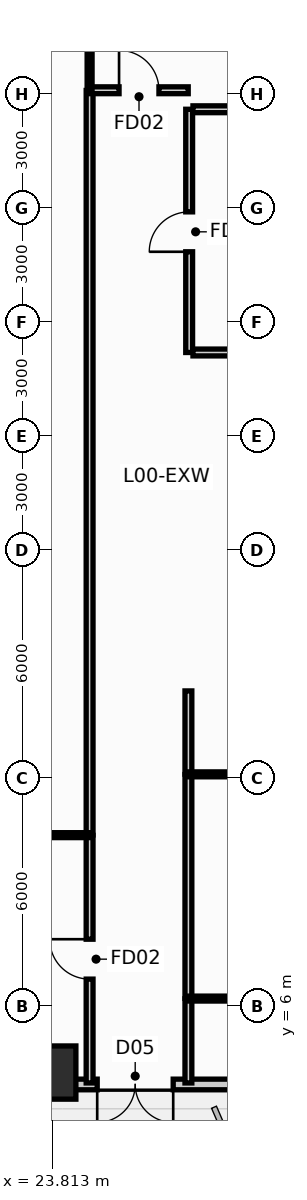
"""IFC4 building model, lengths in metres.
Left out: names, types, materials, properties, quantities, classifications, styles, units other than length and angle.
Written with IfcOpenShell. Run it as: python <this file> out.ifc"""

import sys

from ifc_helpers import new_model, si_unit, direction, frame, frame_2d, origin, origin_2d, place, context, subcontext, project, spatial, rectangle, hollow_rectangle, extrude, source, transform, mapped, element, fill, save


model = new_model("IFC4")
c1 = context("Model", 3, precision=1e-05, world=origin(), true_north=direction((0.0, 1.0)))
c2 = subcontext(c1, "Body", "Model", "MODEL_VIEW")
j1 = project(units=[si_unit("LENGTHUNIT", "METRE"), si_unit("PLANEANGLEUNIT", "RADIAN")], contexts=[c1])
p1 = place(None, origin())
s1 = spatial("IfcSite", under=j1, at=p1, CompositionType="ELEMENT")
p2 = place(p1, origin())
s2 = spatial("IfcBuilding", under=s1, at=p2, CompositionType="ELEMENT")
p3 = place(p2, origin())
s3 = spatial("IfcBuildingStorey", under=s2, at=p3, CompositionType="ELEMENT", Elevation=0.0)
m1 = source(origin(), c2, "Body", "SweptSolid", [
    extrude(hollow_rectangle(XDim=1.4, YDim=1.4, WallThickness=0.08, at=origin_2d()), origin(), (0.0, 0.0, 1.0), 5.401),
])
p4 = place(p3, frame((23.739, 4.253, 0.0), z_axis=(-0.013469326265, 0.019797197665, 0.999713283004), x_axis=(-0.826786039216, -0.562516528964, 0.0)))
e1 = element("IfcColumn", 1, at=p4, inside=s3, PredefinedType="COLUMN", context=c2, shape_type="MappedRepresentation", body=[
    mapped(m1, transform((0.0, 0.0, 0.0), scale=1.0)),
])
p5 = place(p3, frame((45.0, 3.94, 0.0), z_axis=(0.0, 0.0, 1.0), x_axis=(-1.0, 0.0, 0.0)))
e2 = element("IfcWall", 2, at=p5, inside=s3, PredefinedType="STANDARD", context=c2, shape_type="SweptSolid", body=[
    extrude(rectangle(XDim=41.06, YDim=0.28, at=frame_2d((20.53, 0.0))), origin(), (0.0, 0.0, 1.0), 4.065),
])
p6 = place(p5, frame((18.0, 0.0, 0.0)))
e3 = element("IfcOpeningElement", 3, at=p6, cuts=e2, PredefinedType="OPENING", context=c2, shape_type="SweptSolid", body=[
    extrude(rectangle(XDim=2.0, YDim=2.4, at=frame_2d((1.0, 1.2))), frame((0.0, 0.152, 0.0), z_axis=(0.0, -1.0, 0.0), x_axis=(1.0, 0.0, 0.0)), (0.0, 0.0, 1.0), 0.304),
])
p7 = place(p5, frame((25.5, 0.0, 0.0)))
e4 = element("IfcOpeningElement", 4, at=p7, cuts=e2, PredefinedType="OPENING", context=c2, shape_type="SweptSolid", body=[
    extrude(rectangle(XDim=1.1, YDim=2.2, at=frame_2d((0.55, 1.1))), frame((0.0, 0.152, 0.0), z_axis=(0.0, -1.0, 0.0), x_axis=(1.0, 0.0, 0.0)), (0.0, 0.0, 1.0), 0.304),
])
p8 = place(p5, frame((33.16, 0.0, 1.0)))
e5 = element("IfcOpeningElement", 5, at=p8, cuts=e2, PredefinedType="OPENING", context=c2, shape_type="SweptSolid", body=[
    extrude(rectangle(XDim=2.4, YDim=1.95, at=frame_2d((1.2, 0.975))), frame((0.0, 0.152, 0.0), z_axis=(0.0, -1.0, 0.0), x_axis=(1.0, 0.0, 0.0)), (0.0, 0.0, 1.0), 0.304),
])
p9 = place(p3, frame((27.42, 23.2, 0.0), z_axis=(0.0, 0.0, 1.0), x_axis=(0.0, 1.0, 0.0)))
e6 = element("IfcWall", 6, at=p9, inside=s3, PredefinedType="PARTITIONING", context=c2, shape_type="SweptSolid", body=[
    extrude(rectangle(XDim=6.4, YDim=0.18, at=frame_2d((3.2, 0.0))), origin(), (0.0, 0.0, 1.0), 4.706),
])
p10 = place(p9, frame((2.65, 0.0, 0.0)))
e7 = element("IfcOpeningElement", 7, at=p10, cuts=e6, PredefinedType="OPENING", context=c2, shape_type="SweptSolid", body=[
    extrude(rectangle(XDim=1.05, YDim=2.15, at=frame_2d((0.525, 1.075))), frame((0.0, 0.102, 0.0), z_axis=(0.0, -1.0, 0.0), x_axis=(1.0, 0.0, 0.0)), (0.0, 0.0, 1.0), 0.204),
])
p11 = place(p3, frame((27.52, 23.2, 0.0), z_axis=(0.0, 0.0, 1.0), x_axis=(1.0, 0.0, 0.0)))
e8 = element("IfcWall", 8, at=p11, inside=s3, PredefinedType="PARTITIONING", context=c2, shape_type="SweptSolid", body=[
    extrude(rectangle(XDim=2.76, YDim=0.18, at=frame_2d((1.38, 0.0))), origin(), (0.0, 0.0, 1.0), 5.08),
])
p12 = place(p3, frame((27.52, 29.6, 0.0), z_axis=(0.0, 0.0, 1.0), x_axis=(1.0, 0.0, 0.0)))
e9 = element("IfcWall", 9, at=p12, inside=s3, PredefinedType="PARTITIONING", context=c2, shape_type="SweptSolid", body=[
    extrude(rectangle(XDim=2.76, YDim=0.18, at=frame_2d((1.38, 0.0))), origin(), (0.0, 0.0, 1.0), 4.453),
])
p13 = place(p3, frame((24.8, 10.505, 0.0), z_axis=(0.0, 0.0, 1.0), x_axis=(0.0, 1.0, 0.0)))
e10 = element("IfcWall", 10, at=p13, inside=s3, PredefinedType="PARTITIONING", context=c2, shape_type="SweptSolid", body=[
    extrude(rectangle(XDim=19.59, YDim=0.18, at=frame_2d((9.795, 0.0))), origin(), (0.0, 0.0, 1.0), 4.706),
])
p14 = place(p3, frame((24.8, 3.98, 0.0), z_axis=(0.0, 0.0, 1.0), x_axis=(0.0, 1.0, 0.0)))
e11 = element("IfcWall", 11, at=p14, inside=s3, PredefinedType="PARTITIONING", context=c2, shape_type="SweptSolid", body=[
    extrude(rectangle(XDim=6.515, YDim=0.18, at=frame_2d((3.258, 0.0))), origin(), (0.0, 0.0, 1.0), 5.08),
])
p15 = place(p14, frame((2.732, 0.0, 0.0)))
e12 = element("IfcOpeningElement", 12, at=p15, cuts=e11, PredefinedType="OPENING", context=c2, shape_type="SweptSolid", body=[
    extrude(rectangle(XDim=1.05, YDim=2.15, at=frame_2d((0.525, 1.075))), frame((0.0, 0.102, 0.0), z_axis=(0.0, -1.0, 0.0), x_axis=(1.0, 0.0, 0.0)), (0.0, 0.0, 1.0), 0.204),
])
p16 = place(p3, frame((27.4, 6.205, 0.0), z_axis=(0.0, 0.0, 1.0), x_axis=(0.0, 1.0, 0.0)))
e13 = element("IfcWall", 13, at=p16, inside=s3, PredefinedType="PARTITIONING", context=c2, shape_type="SweptSolid", body=[
    extrude(rectangle(XDim=5.89, YDim=0.18, at=frame_2d((2.945, 0.0))), origin(), (0.0, 0.0, 1.0), 5.08),
])
p17 = place(p3, frame((24.805, 30.1, 0.0), z_axis=(0.0, 0.0, 1.0), x_axis=(1.0, 0.0, 0.0)))
e14 = element("IfcWall", 14, at=p17, inside=s3, PredefinedType="PARTITIONING", context=c2, shape_type="SweptSolid", body=[
    extrude(rectangle(XDim=2.59, YDim=0.18, at=frame_2d((1.295, 0.0))), origin(), (0.0, 0.0, 1.0), 4.453),
])
p18 = place(p17, frame((0.77, 0.0, 0.0)))
e15 = element("IfcOpeningElement", 15, at=p18, cuts=e14, PredefinedType="OPENING", context=c2, shape_type="SweptSolid", body=[
    extrude(rectangle(XDim=1.05, YDim=2.15, at=frame_2d((0.525, 1.075))), frame((0.0, 0.102, 0.0), z_axis=(0.0, -1.0, 0.0), x_axis=(1.0, 0.0, 0.0)), (0.0, 0.0, 1.0), 0.204),
])
p19 = place(p3, frame((27.4, 3.98, 0.0), z_axis=(0.0, 0.0, 1.0), x_axis=(0.0, 1.0, 0.0)))
e16 = element("IfcWall", 16, at=p19, inside=s3, PredefinedType="PARTITIONING", context=c2, shape_type="SweptSolid", body=[
    extrude(rectangle(XDim=2.215, YDim=0.18, at=frame_2d((1.107, 0.0))), origin(), (0.0, 0.0, 1.0), 5.08),
])
p20 = place(p3, frame((27.4, 12.105, 0.0), z_axis=(0.0, 0.0, 1.0), x_axis=(0.0, 1.0, 0.0)))
e17 = element("IfcWall", 17, at=p20, inside=s3, PredefinedType="PARTITIONING", context=c2, shape_type="SweptSolid", body=[
    extrude(rectangle(XDim=2.19, YDim=0.18, at=frame_2d((1.095, 0.0))), origin(), (0.0, 0.0, 1.0), 5.08),
])
p21 = place(p3, frame((27.405, 12.1, 0.0), z_axis=(0.0, 0.0, 1.0), x_axis=(1.0, 0.0, 0.0)))
e18 = element("IfcWall", 18, at=p21, inside=s3, PredefinedType="PARTITIONING", context=c2, shape_type="SweptSolid", body=[
    extrude(rectangle(XDim=10.59, YDim=0.13, at=frame_2d((5.295, 0.0))), origin(), (0.0, 0.0, 1.0), 5.08),
])
p22 = place(p21, frame((4.815, 0.0, 0.0)))
e19 = element("IfcOpeningElement", 19, at=p22, cuts=e18, PredefinedType="OPENING", context=c2, shape_type="SweptSolid", body=[
    extrude(rectangle(XDim=0.96, YDim=2.15, at=frame_2d((0.48, 1.075))), frame((0.0, 0.077, 0.0), z_axis=(0.0, -1.0, 0.0), x_axis=(1.0, 0.0, 0.0)), (0.0, 0.0, 1.0), 0.154),
])
p23 = place(p3, frame((27.405, 6.2, 0.0), z_axis=(0.0, 0.0, 1.0), x_axis=(1.0, 0.0, 0.0)))
e20 = element("IfcWall", 20, at=p23, inside=s3, PredefinedType="PARTITIONING", context=c2, shape_type="SweptSolid", body=[
    extrude(rectangle(XDim=10.59, YDim=0.13, at=frame_2d((5.295, 0.0))), origin(), (0.0, 0.0, 1.0), 5.08),
])
p24 = place(p3, frame((15.205, 10.5, 0.0), z_axis=(0.0, 0.0, 1.0), x_axis=(1.0, 0.0, 0.0)))
e21 = element("IfcWall", 21, at=p24, inside=s3, PredefinedType="PARTITIONING", context=c2, shape_type="SweptSolid", body=[
    extrude(rectangle(XDim=9.59, YDim=0.13, at=frame_2d((4.795, 0.0))), origin(), (0.0, 0.0, 1.0), 5.08),
])
p25 = place(p3, frame((24.8, 30.105, 0.0), z_axis=(0.0, 0.0, 1.0), x_axis=(0.0, 1.0, 0.0)))
e22 = element("IfcWall", 22, at=p25, inside=s3, PredefinedType="PARTITIONING", context=c2, shape_type="SweptSolid", body=[
    extrude(rectangle(XDim=3.89, YDim=0.13, at=frame_2d((1.945, 0.0))), origin(), (0.0, 0.0, 1.0), 5.08),
])
p26 = place(p6, origin())
e23 = element("IfcDoor", 23, at=p26, inside=s3, OperationType="DOUBLE_DOOR_SINGLE_SWING", PredefinedType="DOOR", context=c2, shape_type="SweptSolid", body=[
    extrude(rectangle(XDim=2.0, YDim=2.4, at=frame_2d((1.0, 1.2))), frame((0.0, 0.025, 0.0), z_axis=(0.0, -1.0, 0.0), x_axis=(1.0, 0.0, 0.0)), (0.0, 0.0, 1.0), 0.05),
])
fill(e3, e23)
p27 = place(p10, origin())
e24 = element("IfcDoor", 24, at=p27, inside=s3, OperationType="SINGLE_SWING_LEFT", PredefinedType="DOOR", context=c2, shape_type="SweptSolid", body=[
    extrude(rectangle(XDim=1.05, YDim=2.15, at=frame_2d((0.525, 1.075))), frame((0.0, 0.025, 0.0), z_axis=(0.0, -1.0, 0.0), x_axis=(1.0, 0.0, 0.0)), (0.0, 0.0, 1.0), 0.05),
])
fill(e7, e24)
p28 = place(p15, origin())
e25 = element("IfcDoor", 25, at=p28, inside=s3, OperationType="SINGLE_SWING_RIGHT", PredefinedType="DOOR", context=c2, shape_type="SweptSolid", body=[
    extrude(rectangle(XDim=1.05, YDim=2.15, at=frame_2d((0.525, 1.075))), frame((0.0, 0.025, 0.0), z_axis=(0.0, -1.0, 0.0), x_axis=(1.0, 0.0, 0.0)), (0.0, 0.0, 1.0), 0.05),
])
fill(e12, e25)
p29 = place(p18, origin())
e26 = element("IfcDoor", 26, at=p29, inside=s3, OperationType="SINGLE_SWING_LEFT", PredefinedType="DOOR", context=c2, shape_type="SweptSolid", body=[
    extrude(rectangle(XDim=1.05, YDim=2.15, at=frame_2d((0.525, 1.075))), frame((0.0, 0.025, 0.0), z_axis=(0.0, -1.0, 0.0), x_axis=(1.0, 0.0, 0.0)), (0.0, 0.0, 1.0), 0.05),
])
fill(e15, e26)
save(model, sys.argv[1])
